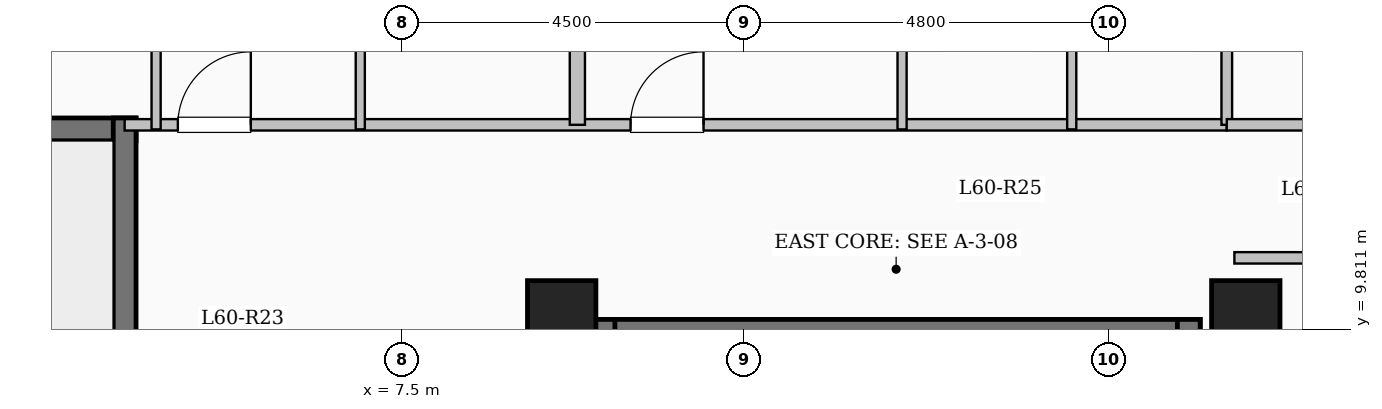
"""IFC4 building model, lengths in metres.
Left out: names, types, materials, properties, quantities, classifications, styles, units other than length and angle.
Written with IfcOpenShell. Run it as: python <this file> out.ifc"""

import sys

from ifc_helpers import new_model, si_unit, direction, frame, frame_2d, origin, origin_2d, place, context, subcontext, project, spatial, rectangle, extrude, element, fill, save


model = new_model("IFC4")
c1 = context("Model", 3, precision=1e-05, world=origin(), true_north=direction((0.0, 1.0)))
c2 = subcontext(c1, "Body", "Model", "MODEL_VIEW")
j1 = project(units=[si_unit("LENGTHUNIT", "METRE"), si_unit("PLANEANGLEUNIT", "RADIAN")], contexts=[c1])
p1 = place(None, origin())
s1 = spatial("IfcSite", under=j1, at=p1, CompositionType="ELEMENT")
p2 = place(p1, origin())
s2 = spatial("IfcBuilding", under=s1, at=p2, CompositionType="ELEMENT")
p3 = place(p2, frame((0.0, 0.0, 220.4)))
s3 = spatial("IfcBuildingStorey", under=s2, at=p3, CompositionType="ELEMENT", Elevation=220.4)
for number, where, z_axis, x_axis in (
    (1, (9.6, 10.0, 0.0), (0.0, 0.0, 1.0), (1.0, 0.0, 0.0)),
    (2, (18.6, 10.0, 0.0), (0.0, 0.0, 1.0), (1.0, 0.0, 0.0)),
):
    element("IfcColumn", number, at=place(p3, frame(where, z_axis=z_axis, x_axis=x_axis)), inside=s3, PredefinedType="COLUMN", context=c2, shape_type="SweptSolid", body=[
        extrude(rectangle(XDim=0.9, YDim=0.9, at=origin_2d()), origin(), (0.0, 0.0, 1.0), 3.35),
    ])
p4 = place(p3, frame((10.0, 9.79, 0.0), z_axis=(0.0, 0.0, 1.0), x_axis=(1.0, 0.0, 0.0)))
e3 = element("IfcWall", 3, at=p4, inside=s3, PredefinedType="SHEAR", context=c2, shape_type="SweptSolid", body=[
    extrude(rectangle(XDim=8.0, YDim=0.3, at=frame_2d((4.0, 0.0))), origin(), (0.0, 0.0, 1.0), 3.35),
])
for number, where, z_axis, x_axis in (
    (4, (10.15, 6.35, 0.0), (0.0, 0.0, 1.0), (0.0, 1.0, 0.0)),
    (5, (17.85, 6.35, 0.0), (0.0, 0.0, 1.0), (0.0, 1.0, 0.0)),
):
    element("IfcWall", number, at=place(p3, frame(where, z_axis=z_axis, x_axis=x_axis)), inside=s3, PredefinedType="SHEAR", context=c2, shape_type="SweptSolid", body=[
        extrude(rectangle(XDim=3.59, YDim=0.3, at=frame_2d((1.795, 0.0))), origin(), (0.0, 0.0, 1.0), 3.35),
    ])
p5 = place(p3, frame((-4.0, 12.44, 0.0), z_axis=(0.0, 0.0, 1.0), x_axis=(1.0, 0.0, 0.0)))
e6 = element("IfcWall", 6, at=p5, inside=s3, PredefinedType="SHEAR", context=c2, shape_type="SweptSolid", body=[
    extrude(rectangle(XDim=8.0, YDim=0.3, at=frame_2d((4.0, 0.0))), origin(), (0.0, 0.0, 1.0), 3.35),
])
p6 = place(p3, frame((3.85, 9.0, 0.0), z_axis=(0.0, 0.0, 1.0), x_axis=(0.0, 1.0, 0.0)))
e7 = element("IfcWall", 7, at=p6, inside=s3, PredefinedType="SHEAR", context=c2, shape_type="SweptSolid", body=[
    extrude(rectangle(XDim=3.59, YDim=0.3, at=frame_2d((1.795, 0.0))), origin(), (0.0, 0.0, 1.0), 3.35),
])
p7 = place(p3, frame((3.85, 12.5, 0.0), z_axis=(0.0, 0.0, 1.0), x_axis=(1.0, 0.0, 0.0)))
e8 = element("IfcWall", 8, at=p7, inside=s3, PredefinedType="PARTITIONING", context=c2, shape_type="SweptSolid", body=[
    extrude(rectangle(XDim=14.5, YDim=0.15, at=frame_2d((7.25, 0.0))), origin(), (0.0, 0.0, 1.0), 3.1),
])
p8 = place(p7, frame((0.7, 0.0, 0.0)))
e9 = element("IfcOpeningElement", 9, at=p8, cuts=e8, PredefinedType="OPENING", context=c2, shape_type="SweptSolid", body=[
    extrude(rectangle(XDim=0.96, YDim=2.15, at=frame_2d((0.48, 1.075))), frame((0.0, 0.085, 0.0), z_axis=(0.0, -1.0, 0.0), x_axis=(1.0, 0.0, 0.0)), (0.0, 0.0, 1.0), 0.17),
])
p9 = place(p7, frame((6.656, 0.0, 0.0)))
e10 = element("IfcOpeningElement", 10, at=p9, cuts=e8, PredefinedType="OPENING", context=c2, shape_type="SweptSolid", body=[
    extrude(rectangle(XDim=0.96, YDim=2.15, at=frame_2d((0.48, 1.075))), frame((0.0, 0.085, 0.0), z_axis=(0.0, -1.0, 0.0), x_axis=(1.0, 0.0, 0.0)), (0.0, 0.0, 1.0), 0.17),
])
p10 = place(p3, frame((9.806, 12.5, 0.0), z_axis=(0.0, 0.0, 1.0), x_axis=(0.0, 1.0, 0.0)))
e11 = element("IfcWall", 11, at=p10, inside=s3, PredefinedType="SOLIDWALL", context=c2, shape_type="SweptSolid", body=[
    extrude(rectangle(XDim=8.695, YDim=0.2, at=frame_2d((4.348, 0.0))), origin(), (0.0, 0.0, 1.0), 3.1),
])
p11 = place(p3, frame((4.264, 12.44, 0.0), z_axis=(0.0, 0.0, 1.0), x_axis=(0.0, 1.0, 0.0)))
e12 = element("IfcWall", 12, at=p11, inside=s3, PredefinedType="PARTITIONING", context=c2, shape_type="SweptSolid", body=[
    extrude(rectangle(XDim=9.94, YDim=0.12, at=frame_2d((4.97, 0.0))), origin(), (0.0, 0.0, 1.0), 3.1),
])
p12 = place(p11, frame((3.245, 0.0, 0.0)))
e13 = element("IfcOpeningElement", 13, at=p12, cuts=e12, PredefinedType="OPENING", context=c2, shape_type="SweptSolid", body=[
    extrude(rectangle(XDim=1.08, YDim=2.15, at=frame_2d((0.54, 1.075))), frame((0.0, 0.07, 0.0), z_axis=(0.0, -1.0, 0.0), x_axis=(1.0, 0.0, 0.0)), (0.0, 0.0, 1.0), 0.14),
])
p13 = place(p3, frame((6.95, 12.44, 0.0), z_axis=(0.0, 0.0, 1.0), x_axis=(0.0, 1.0, 0.0)))
e14 = element("IfcWall", 14, at=p13, inside=s3, PredefinedType="PARTITIONING", context=c2, shape_type="SweptSolid", body=[
    extrude(rectangle(XDim=2.96, YDim=0.12, at=frame_2d((1.48, 0.0))), origin(), (0.0, 0.0, 1.0), 3.1),
])
p14 = place(p3, frame((14.078, 12.44, 0.0), z_axis=(0.0, 0.0, 1.0), x_axis=(0.0, 1.0, 0.0)))
e15 = element("IfcWall", 15, at=p14, inside=s3, PredefinedType="PARTITIONING", context=c2, shape_type="SweptSolid", body=[
    extrude(rectangle(XDim=8.46, YDim=0.12, at=frame_2d((4.23, 0.0))), origin(), (0.0, 0.0, 1.0), 3.1),
])
p15 = place(p14, frame((2.735, 0.0, 0.0)))
e16 = element("IfcOpeningElement", 16, at=p15, cuts=e15, PredefinedType="OPENING", context=c2, shape_type="SweptSolid", body=[
    extrude(rectangle(XDim=1.08, YDim=2.15, at=frame_2d((0.54, 1.075))), frame((0.0, 0.07, 0.0), z_axis=(0.0, -1.0, 0.0), x_axis=(1.0, 0.0, 0.0)), (0.0, 0.0, 1.0), 0.14),
])
p16 = place(p3, frame((16.31, 12.44, 0.0), z_axis=(0.0, 0.0, 1.0), x_axis=(0.0, 1.0, 0.0)))
e17 = element("IfcWall", 17, at=p16, inside=s3, PredefinedType="PARTITIONING", context=c2, shape_type="SweptSolid", body=[
    extrude(rectangle(XDim=2.45, YDim=0.12, at=frame_2d((1.225, 0.0))), origin(), (0.0, 0.0, 1.0), 3.1),
])
p17 = place(p3, frame((18.45, 10.75, 0.0), z_axis=(0.0, 0.0, 1.0), x_axis=(1.0, 0.0, 0.0)))
e18 = element("IfcWall", 18, at=p17, inside=s3, PredefinedType="PARTITIONING", context=c2, shape_type="SweptSolid", body=[
    extrude(rectangle(XDim=5.13, YDim=0.15, at=frame_2d((2.565, 0.0))), origin(), (0.0, 0.0, 1.0), 3.1),
])
p18 = place(p3, frame((18.35, 12.5, 0.0), z_axis=(0.0, 0.0, 1.0), x_axis=(0.0, 1.0, 0.0)))
e19 = element("IfcWall", 19, at=p18, inside=s3, PredefinedType="PARTITIONING", context=c2, shape_type="SweptSolid", body=[
    extrude(rectangle(XDim=4.75, YDim=0.14, at=frame_2d((2.375, 0.0))), origin(), (0.0, 0.0, 1.0), 3.1),
])
p19 = place(p3, frame((18.35, 12.5, 0.0), z_axis=(0.0, 0.0, 1.0), x_axis=(1.0, 0.0, 0.0)))
e20 = element("IfcWall", 20, at=p19, inside=s3, PredefinedType="PARTITIONING", context=c2, shape_type="SweptSolid", body=[
    extrude(rectangle(XDim=5.23, YDim=0.15, at=frame_2d((2.615, 0.0))), origin(), (0.0, 0.0, 1.0), 3.1),
])
p20 = place(p19, frame((2.14, 0.0, 0.0)))
e21 = element("IfcOpeningElement", 21, at=p20, cuts=e20, PredefinedType="OPENING", context=c2, shape_type="SweptSolid", body=[
    extrude(rectangle(XDim=0.95, YDim=2.15, at=frame_2d((0.475, 1.075))), frame((0.0, 0.085, 0.0), z_axis=(0.0, -1.0, 0.0), x_axis=(1.0, 0.0, 0.0)), (0.0, 0.0, 1.0), 0.17),
])
p21 = place(p8, origin())
e22 = element("IfcDoor", 22, at=p21, inside=s3, OperationType="SINGLE_SWING_RIGHT", PredefinedType="DOOR", context=c2, shape_type="SweptSolid", body=[
    extrude(rectangle(XDim=0.96, YDim=2.15, at=frame_2d((0.48, 1.075))), frame((0.0, 0.025, 0.0), z_axis=(0.0, -1.0, 0.0), x_axis=(1.0, 0.0, 0.0)), (0.0, 0.0, 1.0), 0.05),
])
fill(e9, e22)
p22 = place(p9, origin())
e23 = element("IfcDoor", 23, at=p22, inside=s3, OperationType="SINGLE_SWING_RIGHT", PredefinedType="DOOR", context=c2, shape_type="SweptSolid", body=[
    extrude(rectangle(XDim=0.96, YDim=2.15, at=frame_2d((0.48, 1.075))), frame((0.0, 0.025, 0.0), z_axis=(0.0, -1.0, 0.0), x_axis=(1.0, 0.0, 0.0)), (0.0, 0.0, 1.0), 0.05),
])
fill(e10, e23)
save(model, sys.argv[1])
